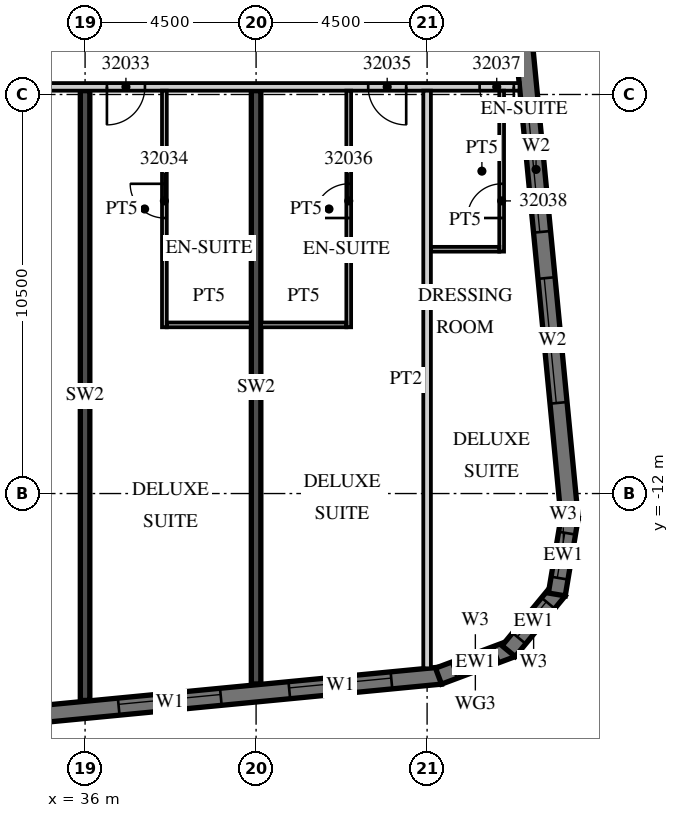
"""IFC4 building model, lengths in metres.
Left out: names, types, materials, properties, quantities, classifications, styles, units other than length and angle.
Written with IfcOpenShell. Run it as: python <this file> out.ifc"""

import sys

from ifc_helpers import new_model, si_unit, direction, frame, frame_2d, origin, place, context, subcontext, project, spatial, polyline, rectangle, outline, extrude, element, fill, save


model = new_model("IFC4")
c1 = context("Model", 3, precision=1e-05, world=origin(), true_north=direction((0.0, 1.0)))
c2 = subcontext(c1, "Body", "Model", "MODEL_VIEW")
j1 = project(units=[si_unit("LENGTHUNIT", "METRE"), si_unit("PLANEANGLEUNIT", "RADIAN")], contexts=[c1])
p1 = place(None, origin())
s1 = spatial("IfcSite", under=j1, at=p1, CompositionType="ELEMENT")
p2 = place(p1, origin())
s2 = spatial("IfcBuilding", under=s1, at=p2, CompositionType="ELEMENT")
p3 = place(p2, frame((0.0, 0.0, 140.5)))
s3 = spatial("IfcBuildingStorey", under=s2, at=p3, CompositionType="ELEMENT", Elevation=140.5)
p4 = place(p3, frame((36.0, -17.444, 0.0), z_axis=(0.0, 0.0, 1.0), x_axis=(0.0, 1.0, 0.0)))
e1 = element("IfcWall", 1, at=p4, inside=s3, PredefinedType="SHEAR", context=c2, shape_type="SweptSolid", body=[
    extrude(rectangle(XDim=16.044, YDim=0.25, at=frame_2d((8.022, 0.0))), origin(), (0.0, 0.0, 1.0), 3.3),
])
p5 = place(p3, frame((40.5, -17.011, 0.0), z_axis=(0.0, 0.0, 1.0), x_axis=(0.0, 1.0, 0.0)))
e2 = element("IfcWall", 2, at=p5, inside=s3, PredefinedType="SHEAR", context=c2, shape_type="SweptSolid", body=[
    extrude(rectangle(XDim=15.611, YDim=0.25, at=frame_2d((7.805, 0.0))), origin(), (0.0, 0.0, 1.0), 3.3),
])
p6 = place(p3, frame((-13.521, -22.46, 0.0), z_axis=(0.0, 0.0, 1.0), x_axis=(0.995396096335, 0.095846812164, 0.0)))
e3 = element("IfcWall", 3, at=p6, inside=s3, PredefinedType="SOLIDWALL", context=c2, shape_type="SweptSolid", body=[
    extrude(rectangle(XDim=59.151, YDim=0.45, at=frame_2d((29.575, 0.0))), origin(), (0.0, 0.0, 1.0), 3.02),
])
p7 = place(p6, frame((0.91, 0.0, 0.45)))
e4 = element("IfcOpeningElement", 4, at=p7, cuts=e3, PredefinedType="OPENING", context=c2, shape_type="SweptSolid", body=[
    extrude(rectangle(XDim=2.7, YDim=2.25, at=frame_2d((1.35, 1.125))), frame((0.0, 0.235, 0.0), z_axis=(0.0, -1.0, 0.0), x_axis=(1.0, 0.0, 0.0)), (0.0, 0.0, 1.0), 0.47),
])
p8 = place(p6, frame((5.431, 0.0, 0.45)))
e5 = element("IfcOpeningElement", 5, at=p8, cuts=e3, PredefinedType="OPENING", context=c2, shape_type="SweptSolid", body=[
    extrude(rectangle(XDim=2.7, YDim=2.25, at=frame_2d((1.35, 1.125))), frame((0.0, 0.235, 0.0), z_axis=(0.0, -1.0, 0.0), x_axis=(1.0, 0.0, 0.0)), (0.0, 0.0, 1.0), 0.47),
])
p9 = place(p6, frame((9.952, 0.0, 0.45)))
e6 = element("IfcOpeningElement", 6, at=p9, cuts=e3, PredefinedType="OPENING", context=c2, shape_type="SweptSolid", body=[
    extrude(rectangle(XDim=2.7, YDim=2.25, at=frame_2d((1.35, 1.125))), frame((0.0, 0.235, 0.0), z_axis=(0.0, -1.0, 0.0), x_axis=(1.0, 0.0, 0.0)), (0.0, 0.0, 1.0), 0.47),
])
p10 = place(p6, frame((14.473, 0.0, 0.45)))
e7 = element("IfcOpeningElement", 7, at=p10, cuts=e3, PredefinedType="OPENING", context=c2, shape_type="SweptSolid", body=[
    extrude(rectangle(XDim=2.7, YDim=2.25, at=frame_2d((1.35, 1.125))), frame((0.0, 0.235, 0.0), z_axis=(0.0, -1.0, 0.0), x_axis=(1.0, 0.0, 0.0)), (0.0, 0.0, 1.0), 0.47),
])
p11 = place(p6, frame((18.994, 0.0, 0.45)))
e8 = element("IfcOpeningElement", 8, at=p11, cuts=e3, PredefinedType="OPENING", context=c2, shape_type="SweptSolid", body=[
    extrude(rectangle(XDim=2.7, YDim=2.25, at=frame_2d((1.35, 1.125))), frame((0.0, 0.235, 0.0), z_axis=(0.0, -1.0, 0.0), x_axis=(1.0, 0.0, 0.0)), (0.0, 0.0, 1.0), 0.47),
])
p12 = place(p6, frame((23.514, 0.0, 0.45)))
e9 = element("IfcOpeningElement", 9, at=p12, cuts=e3, PredefinedType="OPENING", context=c2, shape_type="SweptSolid", body=[
    extrude(rectangle(XDim=2.7, YDim=2.25, at=frame_2d((1.35, 1.125))), frame((0.0, 0.235, 0.0), z_axis=(0.0, -1.0, 0.0), x_axis=(1.0, 0.0, 0.0)), (0.0, 0.0, 1.0), 0.47),
])
p13 = place(p6, frame((28.035, 0.0, 0.45)))
e10 = element("IfcOpeningElement", 10, at=p13, cuts=e3, PredefinedType="OPENING", context=c2, shape_type="SweptSolid", body=[
    extrude(rectangle(XDim=2.7, YDim=2.25, at=frame_2d((1.35, 1.125))), frame((0.0, 0.235, 0.0), z_axis=(0.0, -1.0, 0.0), x_axis=(1.0, 0.0, 0.0)), (0.0, 0.0, 1.0), 0.47),
])
p14 = place(p6, frame((32.556, 0.0, 0.45)))
e11 = element("IfcOpeningElement", 11, at=p14, cuts=e3, PredefinedType="OPENING", context=c2, shape_type="SweptSolid", body=[
    extrude(rectangle(XDim=2.7, YDim=2.25, at=frame_2d((1.35, 1.125))), frame((0.0, 0.235, 0.0), z_axis=(0.0, -1.0, 0.0), x_axis=(1.0, 0.0, 0.0)), (0.0, 0.0, 1.0), 0.47),
])
p15 = place(p6, frame((37.077, 0.0, 0.45)))
e12 = element("IfcOpeningElement", 12, at=p15, cuts=e3, PredefinedType="OPENING", context=c2, shape_type="SweptSolid", body=[
    extrude(rectangle(XDim=2.7, YDim=2.25, at=frame_2d((1.35, 1.125))), frame((0.0, 0.235, 0.0), z_axis=(0.0, -1.0, 0.0), x_axis=(1.0, 0.0, 0.0)), (0.0, 0.0, 1.0), 0.47),
])
p16 = place(p6, frame((41.598, 0.0, 0.45)))
e13 = element("IfcOpeningElement", 13, at=p16, cuts=e3, PredefinedType="OPENING", context=c2, shape_type="SweptSolid", body=[
    extrude(rectangle(XDim=2.7, YDim=2.25, at=frame_2d((1.35, 1.125))), frame((0.0, 0.235, 0.0), z_axis=(0.0, -1.0, 0.0), x_axis=(1.0, 0.0, 0.0)), (0.0, 0.0, 1.0), 0.47),
])
p17 = place(p6, frame((46.118, 0.0, 0.45)))
e14 = element("IfcOpeningElement", 14, at=p17, cuts=e3, PredefinedType="OPENING", context=c2, shape_type="SweptSolid", body=[
    extrude(rectangle(XDim=2.7, YDim=2.25, at=frame_2d((1.35, 1.125))), frame((0.0, 0.235, 0.0), z_axis=(0.0, -1.0, 0.0), x_axis=(1.0, 0.0, 0.0)), (0.0, 0.0, 1.0), 0.47),
])
p18 = place(p6, frame((50.639, 0.0, 0.45)))
e15 = element("IfcOpeningElement", 15, at=p18, cuts=e3, PredefinedType="OPENING", context=c2, shape_type="SweptSolid", body=[
    extrude(rectangle(XDim=2.7, YDim=2.25, at=frame_2d((1.35, 1.125))), frame((0.0, 0.235, 0.0), z_axis=(0.0, -1.0, 0.0), x_axis=(1.0, 0.0, 0.0)), (0.0, 0.0, 1.0), 0.47),
])
p19 = place(p6, frame((55.15, 0.0, 0.45)))
e16 = element("IfcOpeningElement", 16, at=p19, cuts=e3, PredefinedType="OPENING", context=c2, shape_type="SweptSolid", body=[
    extrude(rectangle(XDim=2.7, YDim=2.25, at=frame_2d((1.35, 1.125))), frame((0.0, 0.235, 0.0), z_axis=(0.0, -1.0, 0.0), x_axis=(1.0, 0.0, 0.0)), (0.0, 0.0, 1.0), 0.47),
])
p20 = place(p3, frame((45.3, -16.804, 0.0), z_axis=(0.0, 0.0, 1.0), x_axis=(0.936677599948, 0.350192909346, 0.0)))
e17 = element("IfcWall", 17, at=p20, inside=s3, PredefinedType="SOLIDWALL", context=c2, shape_type="SweptSolid", body=[
    extrude(outline(polyline([(0.0, -0.225), (2.071, -0.225), (1.95, 0.225), (0.121, 0.225), (0.0, -0.225)])), origin(), (0.0, 0.0, 1.0), 3.02),
])
p21 = place(p20, frame((0.435, 0.0, 0.45)))
e18 = element("IfcOpeningElement", 18, at=p21, cuts=e17, PredefinedType="OPENING", context=c2, shape_type="SweptSolid", body=[
    extrude(rectangle(XDim=1.2, YDim=2.25, at=frame_2d((0.6, 1.125))), frame((0.0, 0.235, 0.0), z_axis=(0.0, -1.0, 0.0), x_axis=(1.0, 0.0, 0.0)), (0.0, 0.0, 1.0), 0.47),
])
p22 = place(p3, frame((47.145, -16.147, 0.0), z_axis=(0.0, 0.0, 1.0), x_axis=(0.635988241739, 0.771698747161, 0.0)))
e19 = element("IfcWall", 19, at=p22, inside=s3, PredefinedType="SOLIDWALL", context=c2, shape_type="SweptSolid", body=[
    extrude(outline(polyline([(0.0, -0.225), (2.071, -0.225), (1.95, 0.225), (0.121, 0.225), (0.0, -0.225)])), origin(), (0.0, 0.0, 1.0), 3.02),
])
p23 = place(p22, frame((0.435, 0.0, 0.45)))
e20 = element("IfcOpeningElement", 20, at=p23, cuts=e19, PredefinedType="OPENING", context=c2, shape_type="SweptSolid", body=[
    extrude(rectangle(XDim=1.2, YDim=2.25, at=frame_2d((0.6, 1.125))), frame((0.0, 0.235, 0.0), z_axis=(0.0, -1.0, 0.0), x_axis=(1.0, 0.0, 0.0)), (0.0, 0.0, 1.0), 0.47),
])
p24 = place(p3, frame((48.413, -14.655, 0.0), z_axis=(0.0, 0.0, 1.0), x_axis=(0.165068144653, 0.986282164302, 0.0)))
e21 = element("IfcWall", 21, at=p24, inside=s3, PredefinedType="SOLIDWALL", context=c2, shape_type="SweptSolid", body=[
    extrude(outline(polyline([(0.0, -0.225), (2.071, -0.225), (1.95, 0.225), (0.121, 0.225), (0.0, -0.225)])), origin(), (0.0, 0.0, 1.0), 3.02),
])
p25 = place(p24, frame((0.435, 0.0, 0.45)))
e22 = element("IfcOpeningElement", 22, at=p25, cuts=e21, PredefinedType="OPENING", context=c2, shape_type="SweptSolid", body=[
    extrude(rectangle(XDim=1.2, YDim=2.25, at=frame_2d((0.6, 1.125))), frame((0.0, 0.235, 0.0), z_axis=(0.0, -1.0, 0.0), x_axis=(1.0, 0.0, 0.0)), (0.0, 0.0, 1.0), 0.47),
])
p26 = place(p3, frame((48.753, -12.672, 0.0), z_axis=(0.0, 0.0, 1.0), x_axis=(-0.095842661909, 0.995396495954, 0.0)))
e23 = element("IfcWall", 23, at=p26, inside=s3, PredefinedType="SOLIDWALL", context=c2, shape_type="SweptSolid", body=[
    extrude(rectangle(XDim=35.0, YDim=0.45, at=frame_2d((17.5, 0.0))), origin(), (0.0, 0.0, 1.0), 3.02),
])
p27 = place(p26, frame((3.072, 0.0, 0.45)))
e24 = element("IfcOpeningElement", 24, at=p27, cuts=e23, PredefinedType="OPENING", context=c2, shape_type="SweptSolid", body=[
    extrude(rectangle(XDim=3.3, YDim=2.25, at=frame_2d((1.65, 1.125))), frame((0.0, 0.235, 0.0), z_axis=(0.0, -1.0, 0.0), x_axis=(1.0, 0.0, 0.0)), (0.0, 0.0, 1.0), 0.47),
])
p28 = place(p26, frame((7.593, 0.0, 0.45)))
e25 = element("IfcOpeningElement", 25, at=p28, cuts=e23, PredefinedType="OPENING", context=c2, shape_type="SweptSolid", body=[
    extrude(rectangle(XDim=3.3, YDim=2.25, at=frame_2d((1.65, 1.125))), frame((0.0, 0.235, 0.0), z_axis=(0.0, -1.0, 0.0), x_axis=(1.0, 0.0, 0.0)), (0.0, 0.0, 1.0), 0.47),
])
p29 = place(p3, frame((-13.5, -1.3, 0.0), z_axis=(0.0, 0.0, 1.0), x_axis=(1.0, 0.0, 0.0)))
e26 = element("IfcWall", 26, at=p29, inside=s3, PredefinedType="PARTITIONING", context=c2, shape_type="SweptSolid", body=[
    extrude(rectangle(XDim=60.932, YDim=0.2, at=frame_2d((30.466, 0.0))), origin(), (0.0, 0.0, 1.0), 3.02),
])
p30 = place(p29, frame((2.925, 0.0, 0.0)))
e27 = element("IfcOpeningElement", 27, at=p30, cuts=e26, PredefinedType="OPENING", context=c2, shape_type="SweptSolid", body=[
    extrude(rectangle(XDim=1.0, YDim=2.1, at=frame_2d((0.5, 1.05))), frame((0.0, 0.11, 0.0), z_axis=(0.0, -1.0, 0.0), x_axis=(1.0, 0.0, 0.0)), (0.0, 0.0, 1.0), 0.22),
])
p31 = place(p29, frame((7.45, 0.0, 0.0)))
e28 = element("IfcOpeningElement", 28, at=p31, cuts=e26, PredefinedType="OPENING", context=c2, shape_type="SweptSolid", body=[
    extrude(rectangle(XDim=1.0, YDim=2.1, at=frame_2d((0.5, 1.05))), frame((0.0, 0.11, 0.0), z_axis=(0.0, -1.0, 0.0), x_axis=(1.0, 0.0, 0.0)), (0.0, 0.0, 1.0), 0.22),
])
p32 = place(p29, frame((9.55, 0.0, 0.0)))
e29 = element("IfcOpeningElement", 29, at=p32, cuts=e26, PredefinedType="OPENING", context=c2, shape_type="SweptSolid", body=[
    extrude(rectangle(XDim=1.0, YDim=2.1, at=frame_2d((0.5, 1.05))), frame((0.0, 0.11, 0.0), z_axis=(0.0, -1.0, 0.0), x_axis=(1.0, 0.0, 0.0)), (0.0, 0.0, 1.0), 0.22),
])
p33 = place(p29, frame((15.938, 0.0, 0.0)))
e30 = element("IfcOpeningElement", 30, at=p33, cuts=e26, PredefinedType="OPENING", context=c2, shape_type="SweptSolid", body=[
    extrude(rectangle(XDim=1.2, YDim=2.1, at=frame_2d((0.6, 1.05))), frame((0.0, 0.11, 0.0), z_axis=(0.0, -1.0, 0.0), x_axis=(1.0, 0.0, 0.0)), (0.0, 0.0, 1.0), 0.22),
])
p34 = place(p29, frame((24.938, 0.0, 0.0)))
e31 = element("IfcOpeningElement", 31, at=p34, cuts=e26, PredefinedType="OPENING", context=c2, shape_type="SweptSolid", body=[
    extrude(rectangle(XDim=1.2, YDim=2.1, at=frame_2d((0.6, 1.05))), frame((0.0, 0.11, 0.0), z_axis=(0.0, -1.0, 0.0), x_axis=(1.0, 0.0, 0.0)), (0.0, 0.0, 1.0), 0.22),
])
p35 = place(p29, frame((32.075, 0.0, 0.0)))
e32 = element("IfcOpeningElement", 32, at=p35, cuts=e26, PredefinedType="OPENING", context=c2, shape_type="SweptSolid", body=[
    extrude(rectangle(XDim=1.0, YDim=2.1, at=frame_2d((0.5, 1.05))), frame((0.0, 0.11, 0.0), z_axis=(0.0, -1.0, 0.0), x_axis=(1.0, 0.0, 0.0)), (0.0, 0.0, 1.0), 0.22),
])
p36 = place(p29, frame((36.55, 0.0, 0.0)))
e33 = element("IfcOpeningElement", 33, at=p36, cuts=e26, PredefinedType="OPENING", context=c2, shape_type="SweptSolid", body=[
    extrude(rectangle(XDim=1.0, YDim=2.1, at=frame_2d((0.5, 1.05))), frame((0.0, 0.11, 0.0), z_axis=(0.0, -1.0, 0.0), x_axis=(1.0, 0.0, 0.0)), (0.0, 0.0, 1.0), 0.22),
])
p37 = place(p29, frame((45.862, 0.0, 0.0)))
e34 = element("IfcOpeningElement", 34, at=p37, cuts=e26, PredefinedType="OPENING", context=c2, shape_type="SweptSolid", body=[
    extrude(rectangle(XDim=1.2, YDim=2.1, at=frame_2d((0.6, 1.05))), frame((0.0, 0.11, 0.0), z_axis=(0.0, -1.0, 0.0), x_axis=(1.0, 0.0, 0.0)), (0.0, 0.0, 1.0), 0.22),
])
p38 = place(p29, frame((50.075, 0.0, 0.0)))
e35 = element("IfcOpeningElement", 35, at=p38, cuts=e26, PredefinedType="OPENING", context=c2, shape_type="SweptSolid", body=[
    extrude(rectangle(XDim=1.0, YDim=2.1, at=frame_2d((0.5, 1.05))), frame((0.0, 0.11, 0.0), z_axis=(0.0, -1.0, 0.0), x_axis=(1.0, 0.0, 0.0)), (0.0, 0.0, 1.0), 0.22),
])
p39 = place(p29, frame((56.95, 0.0, 0.0)))
e36 = element("IfcOpeningElement", 36, at=p39, cuts=e26, PredefinedType="OPENING", context=c2, shape_type="SweptSolid", body=[
    extrude(rectangle(XDim=1.0, YDim=2.1, at=frame_2d((0.5, 1.05))), frame((0.0, 0.11, 0.0), z_axis=(0.0, -1.0, 0.0), x_axis=(1.0, 0.0, 0.0)), (0.0, 0.0, 1.0), 0.22),
])
p40 = place(p29, frame((59.882, 0.0, 0.0)))
e37 = element("IfcOpeningElement", 37, at=p40, cuts=e26, PredefinedType="OPENING", context=c2, shape_type="SweptSolid", body=[
    extrude(rectangle(XDim=0.9, YDim=2.1, at=frame_2d((0.45, 1.05))), frame((0.0, 0.11, 0.0), z_axis=(0.0, -1.0, 0.0), x_axis=(1.0, 0.0, 0.0)), (0.0, 0.0, 1.0), 0.22),
])
p41 = place(p3, frame((38.087, -7.625, 0.0), z_axis=(0.0, 0.0, 1.0), x_axis=(0.0, 1.0, 0.0)))
e38 = element("IfcWall", 38, at=p41, inside=s3, PredefinedType="PARTITIONING", context=c2, shape_type="SweptSolid", body=[
    extrude(rectangle(XDim=6.225, YDim=0.125, at=frame_2d((3.113, 0.0))), origin(), (0.0, 0.0, 1.0), 3.02),
])
p42 = place(p41, frame((2.875, 0.0, 0.0)))
e39 = element("IfcOpeningElement", 39, at=p42, cuts=e38, PredefinedType="OPENING", context=c2, shape_type="SweptSolid", body=[
    extrude(rectangle(XDim=0.9, YDim=2.1, at=frame_2d((0.45, 1.05))), frame((0.0, 0.073, 0.0), z_axis=(0.0, -1.0, 0.0), x_axis=(1.0, 0.0, 0.0)), (0.0, 0.0, 1.0), 0.145),
])
p43 = place(p3, frame((38.15, -7.562, 0.0), z_axis=(0.0, 0.0, 1.0), x_axis=(1.0, 0.0, 0.0)))
e40 = element("IfcWall", 40, at=p43, inside=s3, PredefinedType="PARTITIONING", context=c2, shape_type="SweptSolid", body=[
    extrude(rectangle(XDim=2.225, YDim=0.125, at=frame_2d((1.113, 0.0))), origin(), (0.0, 0.0, 1.0), 3.02),
])
p44 = place(p3, frame((45.0, -16.599, 0.0), z_axis=(0.0, 0.0, 1.0), x_axis=(0.0, 1.0, 0.0)))
e41 = element("IfcWall", 41, at=p44, inside=s3, PredefinedType="PARTITIONING", context=c2, shape_type="SweptSolid", body=[
    extrude(rectangle(XDim=15.199, YDim=0.2, at=frame_2d((7.6, 0.0))), origin(), (0.0, 0.0, 1.0), 3.02),
])
p45 = place(p3, frame((42.938, -7.625, 0.0), z_axis=(0.0, 0.0, 1.0), x_axis=(0.0, 1.0, 0.0)))
e42 = element("IfcWall", 42, at=p45, inside=s3, PredefinedType="PARTITIONING", context=c2, shape_type="SweptSolid", body=[
    extrude(rectangle(XDim=6.225, YDim=0.125, at=frame_2d((3.113, 0.0))), origin(), (0.0, 0.0, 1.0), 3.02),
])
p46 = place(p45, frame((2.875, 0.0, 0.0)))
e43 = element("IfcOpeningElement", 43, at=p46, cuts=e42, PredefinedType="OPENING", context=c2, shape_type="SweptSolid", body=[
    extrude(rectangle(XDim=0.9, YDim=2.1, at=frame_2d((0.45, 1.05))), frame((0.0, 0.073, 0.0), z_axis=(0.0, -1.0, 0.0), x_axis=(1.0, 0.0, 0.0)), (0.0, 0.0, 1.0), 0.145),
])
p47 = place(p3, frame((40.625, -7.562, 0.0), z_axis=(0.0, 0.0, 1.0), x_axis=(1.0, 0.0, 0.0)))
e44 = element("IfcWall", 44, at=p47, inside=s3, PredefinedType="PARTITIONING", context=c2, shape_type="SweptSolid", body=[
    extrude(rectangle(XDim=2.25, YDim=0.125, at=frame_2d((1.125, 0.0))), origin(), (0.0, 0.0, 1.0), 3.02),
])
p48 = place(p3, frame((46.962, -5.634, 0.0), z_axis=(0.0, 0.0, 1.0), x_axis=(0.0, 1.0, 0.0)))
e45 = element("IfcWall", 45, at=p48, inside=s3, PredefinedType="PARTITIONING", context=c2, shape_type="SweptSolid", body=[
    extrude(rectangle(XDim=4.234, YDim=0.125, at=frame_2d((2.117, 0.0))), origin(), (0.0, 0.0, 1.0), 3.02),
])
p49 = place(p48, frame((0.884, 0.0, 0.0)))
e46 = element("IfcOpeningElement", 46, at=p49, cuts=e45, PredefinedType="OPENING", context=c2, shape_type="SweptSolid", body=[
    extrude(rectangle(XDim=0.9, YDim=2.1, at=frame_2d((0.45, 1.05))), frame((0.0, 0.073, 0.0), z_axis=(0.0, -1.0, 0.0), x_axis=(1.0, 0.0, 0.0)), (0.0, 0.0, 1.0), 0.145),
])
p50 = place(p3, frame((45.1, -5.572, 0.0), z_axis=(0.0, 0.0, 1.0), x_axis=(1.0, 0.0, 0.0)))
e47 = element("IfcWall", 47, at=p50, inside=s3, PredefinedType="PARTITIONING", context=c2, shape_type="SweptSolid", body=[
    extrude(rectangle(XDim=1.8, YDim=0.125, at=frame_2d((0.9, 0.0))), origin(), (0.0, 0.0, 1.0), 3.02),
])
p51 = place(p18, origin())
e48 = element("IfcWindow", 48, at=p51, inside=s3, PartitioningType="SINGLE_PANEL", PredefinedType="WINDOW", context=c2, shape_type="SweptSolid", body=[
    extrude(rectangle(XDim=2.7, YDim=2.25, at=frame_2d((1.35, 1.125))), frame((0.0, 0.09, 0.0), z_axis=(0.0, -1.0, 0.0), x_axis=(1.0, 0.0, 0.0)), (0.0, 0.0, 1.0), 0.06),
])
fill(e15, e48)
p52 = place(p19, origin())
e49 = element("IfcWindow", 49, at=p52, inside=s3, PartitioningType="SINGLE_PANEL", PredefinedType="WINDOW", context=c2, shape_type="SweptSolid", body=[
    extrude(rectangle(XDim=2.7, YDim=2.25, at=frame_2d((1.35, 1.125))), frame((0.0, 0.09, 0.0), z_axis=(0.0, -1.0, 0.0), x_axis=(1.0, 0.0, 0.0)), (0.0, 0.0, 1.0), 0.06),
])
fill(e16, e49)
p53 = place(p21, origin())
e50 = element("IfcWindow", 50, at=p53, inside=s3, PartitioningType="SINGLE_PANEL", PredefinedType="WINDOW", context=c2, shape_type="SweptSolid", body=[
    extrude(rectangle(XDim=1.2, YDim=2.25, at=frame_2d((0.6, 1.125))), frame((0.0, 0.09, 0.0), z_axis=(0.0, -1.0, 0.0), x_axis=(1.0, 0.0, 0.0)), (0.0, 0.0, 1.0), 0.06),
])
fill(e18, e50)
p54 = place(p23, origin())
e51 = element("IfcWindow", 51, at=p54, inside=s3, PartitioningType="SINGLE_PANEL", PredefinedType="WINDOW", context=c2, shape_type="SweptSolid", body=[
    extrude(rectangle(XDim=1.2, YDim=2.25, at=frame_2d((0.6, 1.125))), frame((0.0, 0.09, 0.0), z_axis=(0.0, -1.0, 0.0), x_axis=(1.0, 0.0, 0.0)), (0.0, 0.0, 1.0), 0.06),
])
fill(e20, e51)
p55 = place(p25, origin())
e52 = element("IfcWindow", 52, at=p55, inside=s3, PartitioningType="SINGLE_PANEL", PredefinedType="WINDOW", context=c2, shape_type="SweptSolid", body=[
    extrude(rectangle(XDim=1.2, YDim=2.25, at=frame_2d((0.6, 1.125))), frame((0.0, 0.09, 0.0), z_axis=(0.0, -1.0, 0.0), x_axis=(1.0, 0.0, 0.0)), (0.0, 0.0, 1.0), 0.06),
])
fill(e22, e52)
p56 = place(p27, origin())
e53 = element("IfcWindow", 53, at=p56, inside=s3, PartitioningType="SINGLE_PANEL", PredefinedType="WINDOW", context=c2, shape_type="SweptSolid", body=[
    extrude(rectangle(XDim=3.3, YDim=2.25, at=frame_2d((1.65, 1.125))), frame((0.0, 0.09, 0.0), z_axis=(0.0, -1.0, 0.0), x_axis=(1.0, 0.0, 0.0)), (0.0, 0.0, 1.0), 0.06),
])
fill(e24, e53)
p57 = place(p28, origin())
e54 = element("IfcWindow", 54, at=p57, inside=s3, PartitioningType="SINGLE_PANEL", PredefinedType="WINDOW", context=c2, shape_type="SweptSolid", body=[
    extrude(rectangle(XDim=3.3, YDim=2.25, at=frame_2d((1.65, 1.125))), frame((0.0, 0.09, 0.0), z_axis=(0.0, -1.0, 0.0), x_axis=(1.0, 0.0, 0.0)), (0.0, 0.0, 1.0), 0.06),
])
fill(e25, e54)
p58 = place(p38, origin())
e55 = element("IfcDoor", 55, at=p58, inside=s3, OperationType="SINGLE_SWING_LEFT", PredefinedType="DOOR", context=c2, shape_type="SweptSolid", body=[
    extrude(rectangle(XDim=1.0, YDim=2.1, at=frame_2d((0.5, 1.05))), frame((0.0, 0.025, 0.0), z_axis=(0.0, -1.0, 0.0), x_axis=(1.0, 0.0, 0.0)), (0.0, 0.0, 1.0), 0.05),
])
fill(e35, e55)
p59 = place(p42, origin())
e56 = element("IfcDoor", 56, at=p59, inside=s3, OperationType="SINGLE_SWING_RIGHT", PredefinedType="DOOR", context=c2, shape_type="SweptSolid", body=[
    extrude(rectangle(XDim=0.9, YDim=2.1, at=frame_2d((0.45, 1.05))), frame((0.0, 0.025, 0.0), z_axis=(0.0, -1.0, 0.0), x_axis=(1.0, 0.0, 0.0)), (0.0, 0.0, 1.0), 0.05),
])
fill(e39, e56)
p60 = place(p39, origin())
e57 = element("IfcDoor", 57, at=p60, inside=s3, OperationType="SINGLE_SWING_RIGHT", PredefinedType="DOOR", context=c2, shape_type="SweptSolid", body=[
    extrude(rectangle(XDim=1.0, YDim=2.1, at=frame_2d((0.5, 1.05))), frame((0.0, 0.025, 0.0), z_axis=(0.0, -1.0, 0.0), x_axis=(1.0, 0.0, 0.0)), (0.0, 0.0, 1.0), 0.05),
])
fill(e36, e57)
p61 = place(p46, origin())
e58 = element("IfcDoor", 58, at=p61, inside=s3, OperationType="SINGLE_SWING_LEFT", PredefinedType="DOOR", context=c2, shape_type="SweptSolid", body=[
    extrude(rectangle(XDim=0.9, YDim=2.1, at=frame_2d((0.45, 1.05))), frame((0.0, 0.025, 0.0), z_axis=(0.0, -1.0, 0.0), x_axis=(1.0, 0.0, 0.0)), (0.0, 0.0, 1.0), 0.05),
])
fill(e43, e58)
p62 = place(p40, origin())
e59 = element("IfcDoor", 59, at=p62, inside=s3, OperationType="SINGLE_SWING_RIGHT", PredefinedType="DOOR", context=c2, shape_type="SweptSolid", body=[
    extrude(rectangle(XDim=0.9, YDim=2.1, at=frame_2d((0.45, 1.05))), frame((0.0, 0.025, 0.0), z_axis=(0.0, -1.0, 0.0), x_axis=(1.0, 0.0, 0.0)), (0.0, 0.0, 1.0), 0.05),
])
fill(e37, e59)
p63 = place(p49, origin())
e60 = element("IfcDoor", 60, at=p63, inside=s3, OperationType="SINGLE_SWING_LEFT", PredefinedType="DOOR", context=c2, shape_type="SweptSolid", body=[
    extrude(rectangle(XDim=0.9, YDim=2.1, at=frame_2d((0.45, 1.05))), frame((0.0, 0.025, 0.0), z_axis=(0.0, -1.0, 0.0), x_axis=(1.0, 0.0, 0.0)), (0.0, 0.0, 1.0), 0.05),
])
fill(e46, e60)
save(model, sys.argv[1])
